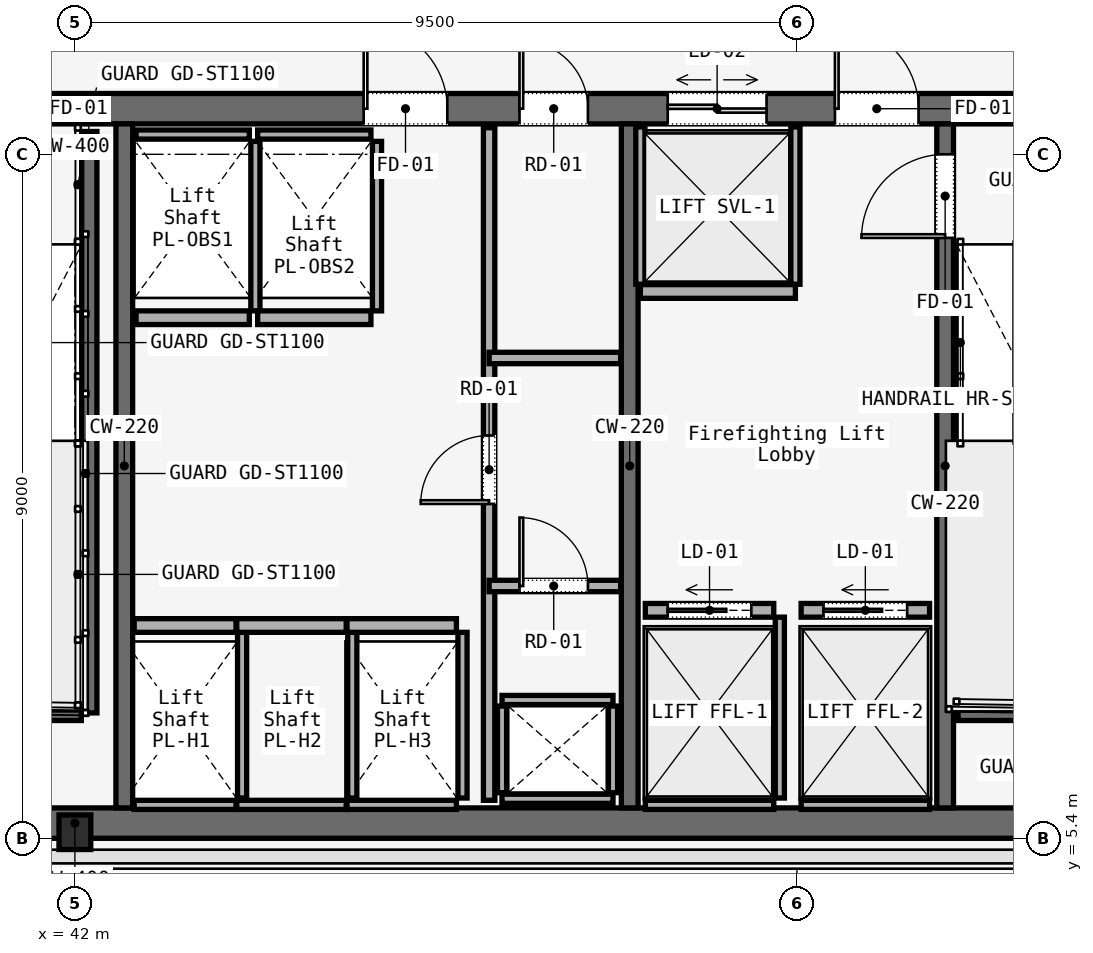
"""IFC4 building model, lengths in metres.
Left out: names, types, materials, properties, quantities, classifications, styles, units other than length and angle.
Written with IfcOpenShell. Run it as: python <this file> out.ifc"""

import sys

from ifc_helpers import new_model, si_unit, direction, frame, frame_2d, origin, origin_2d, place, context, subcontext, project, spatial, rectangle, i_section, extrude, element, fill, save


model = new_model("IFC4")
c1 = context("Model", 3, precision=1e-05, world=origin(), true_north=direction((0.0, 1.0)))
c2 = subcontext(c1, "Body", "Model", "MODEL_VIEW")
j1 = project(units=[si_unit("LENGTHUNIT", "METRE"), si_unit("PLANEANGLEUNIT", "RADIAN")], contexts=[c1])
p1 = place(None, origin())
s1 = spatial("IfcSite", under=j1, at=p1, CompositionType="ELEMENT")
p2 = place(p1, origin())
s2 = spatial("IfcBuilding", under=s1, at=p2, CompositionType="ELEMENT")
p3 = place(p2, frame((0.0, 0.0, 180.2)))
s3 = spatial("IfcBuildingStorey", under=s2, at=p3, CompositionType="ELEMENT", Elevation=180.2)
p4 = place(p3, frame((26.45, 15.0, 0.0), z_axis=(0.0, 0.0, 1.0), x_axis=(1.0, 0.0, 0.0)))
e1 = element("IfcWall", 1, at=p4, inside=s3, PredefinedType="SOLIDWALL", context=c2, shape_type="SweptSolid", body=[
    extrude(rectangle(XDim=31.1, YDim=0.4, at=frame_2d((15.55, 0.0))), origin(), (0.0, 0.0, 1.0), 3.58),
])
p5 = place(p4, frame((1.65, 0.0, 0.0)))
e2 = element("IfcOpeningElement", 2, at=p5, cuts=e1, PredefinedType="OPENING", context=c2, shape_type="SweptSolid", body=[
    extrude(rectangle(XDim=1.1, YDim=2.2, at=frame_2d((0.55, 1.1))), frame((0.0, 0.2, 0.0), z_axis=(0.0, -1.0, 0.0), x_axis=(1.0, 0.0, 0.0)), (0.0, 0.0, 1.0), 0.4),
])
p6 = place(p4, frame((13.65, 0.0, 0.0)))
e3 = element("IfcOpeningElement", 3, at=p6, cuts=e1, PredefinedType="OPENING", context=c2, shape_type="SweptSolid", body=[
    extrude(rectangle(XDim=1.1, YDim=2.2, at=frame_2d((0.55, 1.1))), frame((0.0, 0.2, 0.0), z_axis=(0.0, -1.0, 0.0), x_axis=(1.0, 0.0, 0.0)), (0.0, 0.0, 1.0), 0.4),
])
p7 = place(p4, frame((25.55, 0.0, 0.0)))
e4 = element("IfcOpeningElement", 4, at=p7, cuts=e1, PredefinedType="OPENING", context=c2, shape_type="SweptSolid", body=[
    extrude(rectangle(XDim=1.1, YDim=2.2, at=frame_2d((0.55, 1.1))), frame((0.0, 0.2, 0.0), z_axis=(0.0, -1.0, 0.0), x_axis=(1.0, 0.0, 0.0)), (0.0, 0.0, 1.0), 0.4),
])
p8 = place(p4, frame((10.7, 0.0, 0.0)))
e5 = element("IfcOpeningElement", 5, at=p8, cuts=e1, PredefinedType="OPENING", context=c2, shape_type="SweptSolid", body=[
    extrude(rectangle(XDim=1.4, YDim=2.2, at=frame_2d((0.7, 1.1))), frame((0.0, 0.2, 0.0), z_axis=(0.0, -1.0, 0.0), x_axis=(1.0, 0.0, 0.0)), (0.0, 0.0, 1.0), 0.4),
])
p9 = place(p4, frame((19.35, 0.0, 0.0)))
e6 = element("IfcOpeningElement", 6, at=p9, cuts=e1, PredefinedType="OPENING", context=c2, shape_type="SweptSolid", body=[
    extrude(rectangle(XDim=1.1, YDim=2.2, at=frame_2d((0.55, 1.1))), frame((0.0, 0.2, 0.0), z_axis=(0.0, -1.0, 0.0), x_axis=(1.0, 0.0, 0.0)), (0.0, 0.0, 1.0), 0.4),
])
p10 = place(p4, frame((21.4, 0.0, 0.0)))
e7 = element("IfcOpeningElement", 7, at=p10, cuts=e1, PredefinedType="OPENING", context=c2, shape_type="SweptSolid", body=[
    extrude(rectangle(XDim=0.9, YDim=2.1, at=frame_2d((0.45, 1.05))), frame((0.0, 0.2, 0.0), z_axis=(0.0, -1.0, 0.0), x_axis=(1.0, 0.0, 0.0)), (0.0, 0.0, 1.0), 0.4),
])
p11 = place(p4, frame((23.35, 0.0, 0.0)))
e8 = element("IfcOpeningElement", 8, at=p11, cuts=e1, PredefinedType="OPENING", context=c2, shape_type="SweptSolid", body=[
    extrude(rectangle(XDim=1.3, YDim=2.3, at=frame_2d((0.65, 1.15))), frame((0.0, 0.2, 0.0), z_axis=(0.0, -1.0, 0.0), x_axis=(1.0, 0.0, 0.0)), (0.0, 0.0, 1.0), 0.4),
])
p12 = place(p3, frame((26.45, 5.6, 0.0), z_axis=(0.0, 0.0, 1.0), x_axis=(1.0, 0.0, 0.0)))
e9 = element("IfcWall", 9, at=p12, inside=s3, PredefinedType="SOLIDWALL", context=c2, shape_type="SweptSolid", body=[
    extrude(rectangle(XDim=31.1, YDim=0.4, at=frame_2d((15.55, 0.0))), origin(), (0.0, 0.0, 1.0), 3.58),
])
for number, where, z_axis, x_axis in (
    (10, (42.65, 5.8, 0.0), (0.0, 0.0, 1.0), (0.0, 1.0, 0.0)),
    (11, (49.3, 5.8, 0.0), (0.0, 0.0, 1.0), (0.0, 1.0, 0.0)),
):
    element("IfcWall", number, at=place(p3, frame(where, z_axis=z_axis, x_axis=x_axis)), inside=s3, PredefinedType="SOLIDWALL", context=c2, shape_type="SweptSolid", body=[
        extrude(rectangle(XDim=9.0, YDim=0.22, at=frame_2d((4.5, 0.0))), origin(), (0.0, 0.0, 1.0), 3.58),
    ])
p13 = place(p3, frame((53.45, 5.8, 0.0), z_axis=(0.0, 0.0, 1.0), x_axis=(0.0, 1.0, 0.0)))
e12 = element("IfcWall", 12, at=p13, inside=s3, PredefinedType="SOLIDWALL", context=c2, shape_type="SweptSolid", body=[
    extrude(rectangle(XDim=9.0, YDim=0.22, at=frame_2d((4.5, 0.0))), origin(), (0.0, 0.0, 1.0), 3.58),
])
p14 = place(p13, frame((7.5, 0.0, 0.0)))
e13 = element("IfcOpeningElement", 13, at=p14, cuts=e12, PredefinedType="OPENING", context=c2, shape_type="SweptSolid", body=[
    extrude(rectangle(XDim=1.1, YDim=2.2, at=frame_2d((0.55, 1.1))), frame((0.0, 0.11, 0.0), z_axis=(0.0, -1.0, 0.0), x_axis=(1.0, 0.0, 0.0)), (0.0, 0.0, 1.0), 0.22),
])
p15 = place(p3, frame((42.0, 5.48, 0.0), z_axis=(0.0, 0.0, 1.0), x_axis=(1.0, 0.0, 0.0)))
e14 = element("IfcColumn", 14, at=p15, inside=s3, PredefinedType="COLUMN", context=c2, shape_type="SweptSolid", body=[
    extrude(i_section(OverallWidth=0.418, OverallDepth=0.455, WebThickness=0.042, FlangeThickness=0.052, FilletRadius=0.015, at=origin_2d()), origin(), (0.0, 0.0, 1.0), 3.58),
])
p16 = place(p3, frame((42.19, 14.7, 0.0), z_axis=(0.0, 0.0, 1.0), x_axis=(0.0, -1.0, 0.0)))
e15 = element("IfcWall", 15, at=p16, inside=s3, PredefinedType="SOLIDWALL", context=c2, shape_type="SweptSolid", body=[
    extrude(rectangle(XDim=7.65, YDim=0.2, at=frame_2d((3.825, 0.0))), origin(), (0.0, 0.0, 1.0), 3.8),
])
for number, where, z_axis, x_axis in (
    (16, (38.97, 7.05, 0.0), (0.0, 0.0, 1.0), (1.0, 0.0, 0.0)),
    (17, (53.62, 7.05, 0.0), (0.0, 0.0, 1.0), (1.0, 0.0, 0.0)),
):
    element("IfcWall", number, at=place(p3, frame(where, z_axis=z_axis, x_axis=x_axis)), inside=s3, PredefinedType="SOLIDWALL", context=c2, shape_type="SweptSolid", body=[
        extrude(rectangle(XDim=3.115, YDim=0.2, at=frame_2d((1.558, 0.0))), origin(), (0.0, 0.0, 1.0), 3.8),
    ])
for number, where, z_axis, x_axis in (
    (18, (47.62, 5.92, 0.0), (0.0, 0.0, 1.0), (1.0, 0.0, 0.0)),
    (19, (47.62, 7.22, 0.0), (0.0, 0.0, 1.0), (1.0, 0.0, 0.0)),
):
    element("IfcWall", number, at=place(p3, frame(where, z_axis=z_axis, x_axis=x_axis)), inside=s3, PredefinedType="SOLIDWALL", context=c2, shape_type="SweptSolid", body=[
        extrude(rectangle(XDim=1.46, YDim=0.12, at=frame_2d((0.73, 0.0))), origin(), (0.0, 0.0, 1.0), 3.01),
    ])
for number, where, z_axis, x_axis in (
    (20, (47.62, 6.0, 0.0), (0.0, 0.0, 1.0), (0.0, 1.0, 0.0)),
    (21, (49.08, 6.0, 0.0), (0.0, 0.0, 1.0), (0.0, 1.0, 0.0)),
):
    element("IfcWall", number, at=place(p3, frame(where, z_axis=z_axis, x_axis=x_axis)), inside=s3, PredefinedType="SOLIDWALL", context=c2, shape_type="SweptSolid", body=[
        extrude(rectangle(XDim=1.14, YDim=0.12, at=frame_2d((0.57, 0.0))), origin(), (0.0, 0.0, 1.0), 3.01),
    ])
p17 = place(p3, frame((47.45, 5.9, 0.0), z_axis=(0.0, 0.0, 1.0), x_axis=(0.0, 1.0, 0.0)))
e22 = element("IfcWall", 22, at=p17, inside=s3, PredefinedType="PARTITIONING", context=c2, shape_type="SweptSolid", body=[
    extrude(rectangle(XDim=8.85, YDim=0.15, at=frame_2d((4.425, 0.0))), origin(), (0.0, 0.0, 1.0), 3.01),
])
p18 = place(p17, frame((3.9, 0.0, 0.0)))
e23 = element("IfcOpeningElement", 23, at=p18, cuts=e22, PredefinedType="OPENING", context=c2, shape_type="SweptSolid", body=[
    extrude(rectangle(XDim=0.9, YDim=2.1, at=frame_2d((0.45, 1.05))), frame((0.0, 0.075, 0.0), z_axis=(0.0, -1.0, 0.0), x_axis=(1.0, 0.0, 0.0)), (0.0, 0.0, 1.0), 0.15),
])
p19 = place(p3, frame((47.45, 8.72, 0.0), z_axis=(0.0, 0.0, 1.0), x_axis=(1.0, 0.0, 0.0)))
e24 = element("IfcWall", 24, at=p19, inside=s3, PredefinedType="PARTITIONING", context=c2, shape_type="SweptSolid", body=[
    extrude(rectangle(XDim=1.73, YDim=0.15, at=frame_2d((0.865, 0.0))), origin(), (0.0, 0.0, 1.0), 3.01),
])
p20 = place(p19, frame((0.4, 0.0, 0.0)))
e25 = element("IfcOpeningElement", 25, at=p20, cuts=e24, PredefinedType="OPENING", context=c2, shape_type="SweptSolid", body=[
    extrude(rectangle(XDim=0.9, YDim=2.1, at=frame_2d((0.45, 1.05))), frame((0.0, 0.075, 0.0), z_axis=(0.0, -1.0, 0.0), x_axis=(1.0, 0.0, 0.0)), (0.0, 0.0, 1.0), 0.15),
])
p21 = place(p3, frame((47.45, 11.72, 0.0), z_axis=(0.0, 0.0, 1.0), x_axis=(1.0, 0.0, 0.0)))
e26 = element("IfcWall", 26, at=p21, inside=s3, PredefinedType="PARTITIONING", context=c2, shape_type="SweptSolid", body=[
    extrude(rectangle(XDim=1.73, YDim=0.15, at=frame_2d((0.865, 0.0))), origin(), (0.0, 0.0, 1.0), 3.01),
])
p22 = place(p3, frame((42.78, 8.2, 0.0), z_axis=(0.0, 0.0, 1.0), x_axis=(1.0, 0.0, 0.0)))
e27 = element("IfcWall", 27, at=p22, inside=s3, PredefinedType="SOLIDWALL", context=c2, shape_type="SweptSolid", body=[
    extrude(rectangle(XDim=1.34, YDim=0.18, at=frame_2d((0.67, 0.0))), origin(), (0.0, 0.0, 1.0), 3.01),
])
p23 = place(p3, frame((42.78, 5.84, 0.0), z_axis=(0.0, 0.0, 1.0), x_axis=(1.0, 0.0, 0.0)))
e28 = element("IfcWall", 28, at=p23, inside=s3, PredefinedType="SOLIDWALL", context=c2, shape_type="SweptSolid", body=[
    extrude(rectangle(XDim=1.34, YDim=0.12, at=frame_2d((0.67, 0.0))), origin(), (0.0, 0.0, 1.0), 3.01),
])
p24 = place(p3, frame((44.2, 5.93, 0.0), z_axis=(0.0, 0.0, 1.0), x_axis=(0.0, 1.0, 0.0)))
e29 = element("IfcWall", 29, at=p24, inside=s3, PredefinedType="SOLIDWALL", context=c2, shape_type="SweptSolid", body=[
    extrude(rectangle(XDim=2.18, YDim=0.12, at=frame_2d((1.09, 0.0))), origin(), (0.0, 0.0, 1.0), 3.01),
])
p25 = place(p3, frame((44.13, 8.2, 0.0), z_axis=(0.0, 0.0, 1.0), x_axis=(1.0, 0.0, 0.0)))
e30 = element("IfcWall", 30, at=p25, inside=s3, PredefinedType="SOLIDWALL", context=c2, shape_type="SweptSolid", body=[
    extrude(rectangle(XDim=1.44, YDim=0.18, at=frame_2d((0.72, 0.0))), origin(), (0.0, 0.0, 1.0), 3.01),
])
p26 = place(p3, frame((44.13, 5.84, 0.0), z_axis=(0.0, 0.0, 1.0), x_axis=(1.0, 0.0, 0.0)))
e31 = element("IfcWall", 31, at=p26, inside=s3, PredefinedType="SOLIDWALL", context=c2, shape_type="SweptSolid", body=[
    extrude(rectangle(XDim=1.44, YDim=0.12, at=frame_2d((0.72, 0.0))), origin(), (0.0, 0.0, 1.0), 3.01),
])
p27 = place(p3, frame((45.65, 5.93, 0.0), z_axis=(0.0, 0.0, 1.0), x_axis=(0.0, 1.0, 0.0)))
e32 = element("IfcWall", 32, at=p27, inside=s3, PredefinedType="SOLIDWALL", context=c2, shape_type="SweptSolid", body=[
    extrude(rectangle(XDim=2.18, YDim=0.12, at=frame_2d((1.09, 0.0))), origin(), (0.0, 0.0, 1.0), 3.01),
])
p28 = place(p3, frame((45.58, 8.2, 0.0), z_axis=(0.0, 0.0, 1.0), x_axis=(1.0, 0.0, 0.0)))
e33 = element("IfcWall", 33, at=p28, inside=s3, PredefinedType="SOLIDWALL", context=c2, shape_type="SweptSolid", body=[
    extrude(rectangle(XDim=1.44, YDim=0.18, at=frame_2d((0.72, 0.0))), origin(), (0.0, 0.0, 1.0), 3.01),
])
p29 = place(p3, frame((45.58, 5.84, 0.0), z_axis=(0.0, 0.0, 1.0), x_axis=(1.0, 0.0, 0.0)))
e34 = element("IfcWall", 34, at=p29, inside=s3, PredefinedType="SOLIDWALL", context=c2, shape_type="SweptSolid", body=[
    extrude(rectangle(XDim=1.44, YDim=0.12, at=frame_2d((0.72, 0.0))), origin(), (0.0, 0.0, 1.0), 3.01),
])
p30 = place(p3, frame((47.1, 5.93, 0.0), z_axis=(0.0, 0.0, 1.0), x_axis=(0.0, 1.0, 0.0)))
e35 = element("IfcWall", 35, at=p30, inside=s3, PredefinedType="SOLIDWALL", context=c2, shape_type="SweptSolid", body=[
    extrude(rectangle(XDim=2.18, YDim=0.12, at=frame_2d((1.09, 0.0))), origin(), (0.0, 0.0, 1.0), 3.01),
])
p31 = place(p3, frame((42.805, 12.25, 0.0), z_axis=(0.0, 0.0, 1.0), x_axis=(1.0, 0.0, 0.0)))
e36 = element("IfcWall", 36, at=p31, inside=s3, PredefinedType="SOLIDWALL", context=c2, shape_type="SweptSolid", body=[
    extrude(rectangle(XDim=1.49, YDim=0.18, at=frame_2d((0.745, 0.0))), origin(), (0.0, 0.0, 1.0), 3.01),
])
p32 = place(p3, frame((42.805, 14.66, 0.0), z_axis=(0.0, 0.0, 1.0), x_axis=(1.0, 0.0, 0.0)))
e37 = element("IfcWall", 37, at=p32, inside=s3, PredefinedType="SOLIDWALL", context=c2, shape_type="SweptSolid", body=[
    extrude(rectangle(XDim=1.49, YDim=0.12, at=frame_2d((0.745, 0.0))), origin(), (0.0, 0.0, 1.0), 3.01),
])
p33 = place(p3, frame((44.375, 12.34, 0.0), z_axis=(0.0, 0.0, 1.0), x_axis=(0.0, 1.0, 0.0)))
e38 = element("IfcWall", 38, at=p33, inside=s3, PredefinedType="SOLIDWALL", context=c2, shape_type="SweptSolid", body=[
    extrude(rectangle(XDim=2.23, YDim=0.12, at=frame_2d((1.115, 0.0))), origin(), (0.0, 0.0, 1.0), 3.01),
])
p34 = place(p3, frame((44.405, 12.25, 0.0), z_axis=(0.0, 0.0, 1.0), x_axis=(1.0, 0.0, 0.0)))
e39 = element("IfcWall", 39, at=p34, inside=s3, PredefinedType="SOLIDWALL", context=c2, shape_type="SweptSolid", body=[
    extrude(rectangle(XDim=1.49, YDim=0.18, at=frame_2d((0.745, 0.0))), origin(), (0.0, 0.0, 1.0), 3.01),
])
p35 = place(p3, frame((44.405, 14.66, 0.0), z_axis=(0.0, 0.0, 1.0), x_axis=(1.0, 0.0, 0.0)))
e40 = element("IfcWall", 40, at=p35, inside=s3, PredefinedType="SOLIDWALL", context=c2, shape_type="SweptSolid", body=[
    extrude(rectangle(XDim=1.49, YDim=0.12, at=frame_2d((0.745, 0.0))), origin(), (0.0, 0.0, 1.0), 3.01),
])
p36 = place(p3, frame((45.975, 12.34, 0.0), z_axis=(0.0, 0.0, 1.0), x_axis=(0.0, 1.0, 0.0)))
e41 = element("IfcWall", 41, at=p36, inside=s3, PredefinedType="SOLIDWALL", context=c2, shape_type="SweptSolid", body=[
    extrude(rectangle(XDim=2.23, YDim=0.12, at=frame_2d((1.115, 0.0))), origin(), (0.0, 0.0, 1.0), 3.01),
])
p37 = place(p3, frame((49.505, 8.4, 0.0), z_axis=(0.0, 0.0, 1.0), x_axis=(1.0, 0.0, 0.0)))
e42 = element("IfcWall", 42, at=p37, inside=s3, PredefinedType="SOLIDWALL", context=c2, shape_type="SweptSolid", body=[
    extrude(rectangle(XDim=1.69, YDim=0.18, at=frame_2d((0.845, 0.0))), origin(), (0.0, 0.0, 1.0), 3.01),
])
p38 = place(p37, frame((0.295, 0.0, 0.0)))
e43 = element("IfcOpeningElement", 43, at=p38, cuts=e42, PredefinedType="OPENING", context=c2, shape_type="SweptSolid", body=[
    extrude(rectangle(XDim=1.1, YDim=2.2, at=frame_2d((0.55, 1.1))), frame((0.0, 0.09, 0.0), z_axis=(0.0, -1.0, 0.0), x_axis=(1.0, 0.0, 0.0)), (0.0, 0.0, 1.0), 0.18),
])
p39 = place(p3, frame((49.505, 5.84, 0.0), z_axis=(0.0, 0.0, 1.0), x_axis=(1.0, 0.0, 0.0)))
e44 = element("IfcWall", 44, at=p39, inside=s3, PredefinedType="SOLIDWALL", context=c2, shape_type="SweptSolid", body=[
    extrude(rectangle(XDim=1.69, YDim=0.12, at=frame_2d((0.845, 0.0))), origin(), (0.0, 0.0, 1.0), 3.01),
])
p40 = place(p3, frame((51.275, 5.93, 0.0), z_axis=(0.0, 0.0, 1.0), x_axis=(0.0, 1.0, 0.0)))
e45 = element("IfcWall", 45, at=p40, inside=s3, PredefinedType="SOLIDWALL", context=c2, shape_type="SweptSolid", body=[
    extrude(rectangle(XDim=2.38, YDim=0.12, at=frame_2d((1.19, 0.0))), origin(), (0.0, 0.0, 1.0), 3.01),
])
p41 = place(p3, frame((51.555, 8.4, 0.0), z_axis=(0.0, 0.0, 1.0), x_axis=(1.0, 0.0, 0.0)))
e46 = element("IfcWall", 46, at=p41, inside=s3, PredefinedType="SOLIDWALL", context=c2, shape_type="SweptSolid", body=[
    extrude(rectangle(XDim=1.69, YDim=0.18, at=frame_2d((0.845, 0.0))), origin(), (0.0, 0.0, 1.0), 3.01),
])
p42 = place(p41, frame((0.295, 0.0, 0.0)))
e47 = element("IfcOpeningElement", 47, at=p42, cuts=e46, PredefinedType="OPENING", context=c2, shape_type="SweptSolid", body=[
    extrude(rectangle(XDim=1.1, YDim=2.2, at=frame_2d((0.55, 1.1))), frame((0.0, 0.09, 0.0), z_axis=(0.0, -1.0, 0.0), x_axis=(1.0, 0.0, 0.0)), (0.0, 0.0, 1.0), 0.18),
])
p43 = place(p3, frame((51.555, 5.84, 0.0), z_axis=(0.0, 0.0, 1.0), x_axis=(1.0, 0.0, 0.0)))
e48 = element("IfcWall", 48, at=p43, inside=s3, PredefinedType="SOLIDWALL", context=c2, shape_type="SweptSolid", body=[
    extrude(rectangle(XDim=1.69, YDim=0.12, at=frame_2d((0.845, 0.0))), origin(), (0.0, 0.0, 1.0), 3.01),
])
p44 = place(p3, frame((49.44, 12.595, 0.0), z_axis=(0.0, 0.0, 1.0), x_axis=(1.0, 0.0, 0.0)))
e49 = element("IfcWall", 49, at=p44, inside=s3, PredefinedType="SOLIDWALL", context=c2, shape_type="SweptSolid", body=[
    extrude(rectangle(XDim=2.04, YDim=0.18, at=frame_2d((1.02, 0.0))), origin(), (0.0, 0.0, 1.0), 3.01),
])
for number, where, z_axis, x_axis in (
    (50, (49.44, 12.69, 0.0), (0.0, 0.0, 1.0), (0.0, 1.0, 0.0)),
    (51, (51.48, 12.69, 0.0), (0.0, 0.0, 1.0), (0.0, 1.0, 0.0)),
):
    element("IfcWall", number, at=place(p3, frame(where, z_axis=z_axis, x_axis=x_axis)), inside=s3, PredefinedType="SOLIDWALL", context=c2, shape_type="SweptSolid", body=[
        extrude(rectangle(XDim=2.07, YDim=0.12, at=frame_2d((1.035, 0.0))), origin(), (0.0, 0.0, 1.0), 3.01),
    ])
p45 = place(p7, origin())
e52 = element("IfcDoor", 52, at=p45, inside=s3, OperationType="SINGLE_SWING_RIGHT", PredefinedType="DOOR", context=c2, shape_type="SweptSolid", body=[
    extrude(rectangle(XDim=1.1, YDim=2.2, at=frame_2d((0.55, 1.1))), frame((0.0, 0.025, 0.0), z_axis=(0.0, -1.0, 0.0), x_axis=(1.0, 0.0, 0.0)), (0.0, 0.0, 1.0), 0.05),
])
fill(e4, e52)
p46 = place(p9, origin())
e53 = element("IfcDoor", 53, at=p46, inside=s3, OperationType="SINGLE_SWING_LEFT", PredefinedType="DOOR", context=c2, shape_type="SweptSolid", body=[
    extrude(rectangle(XDim=1.1, YDim=2.2, at=frame_2d((0.55, 1.1))), frame((0.0, 0.025, 0.0), z_axis=(0.0, -1.0, 0.0), x_axis=(1.0, 0.0, 0.0)), (0.0, 0.0, 1.0), 0.05),
])
fill(e6, e53)
p47 = place(p10, origin())
e54 = element("IfcDoor", 54, at=p47, inside=s3, OperationType="SINGLE_SWING_LEFT", PredefinedType="DOOR", context=c2, shape_type="SweptSolid", body=[
    extrude(rectangle(XDim=0.9, YDim=2.1, at=frame_2d((0.45, 1.05))), frame((0.0, 0.025, 0.0), z_axis=(0.0, -1.0, 0.0), x_axis=(1.0, 0.0, 0.0)), (0.0, 0.0, 1.0), 0.05),
])
fill(e7, e54)
p48 = place(p14, origin())
e55 = element("IfcDoor", 55, at=p48, inside=s3, OperationType="SINGLE_SWING_LEFT", PredefinedType="DOOR", context=c2, shape_type="SweptSolid", body=[
    extrude(rectangle(XDim=1.1, YDim=2.2, at=frame_2d((0.55, 1.1))), frame((0.0, 0.025, 0.0), z_axis=(0.0, -1.0, 0.0), x_axis=(1.0, 0.0, 0.0)), (0.0, 0.0, 1.0), 0.05),
])
fill(e13, e55)
p49 = place(p18, origin())
e56 = element("IfcDoor", 56, at=p49, inside=s3, OperationType="SINGLE_SWING_LEFT", PredefinedType="DOOR", context=c2, shape_type="SweptSolid", body=[
    extrude(rectangle(XDim=0.9, YDim=2.1, at=frame_2d((0.45, 1.05))), frame((0.0, 0.025, 0.0), z_axis=(0.0, -1.0, 0.0), x_axis=(1.0, 0.0, 0.0)), (0.0, 0.0, 1.0), 0.05),
])
fill(e23, e56)
p50 = place(p20, origin())
e57 = element("IfcDoor", 57, at=p50, inside=s3, OperationType="SINGLE_SWING_RIGHT", PredefinedType="DOOR", context=c2, shape_type="SweptSolid", body=[
    extrude(rectangle(XDim=0.9, YDim=2.1, at=frame_2d((0.45, 1.05))), frame((0.0, 0.025, 0.0), z_axis=(0.0, -1.0, 0.0), x_axis=(1.0, 0.0, 0.0)), (0.0, 0.0, 1.0), 0.05),
])
fill(e25, e57)
p51 = place(p38, origin())
e58 = element("IfcDoor", 58, at=p51, inside=s3, OperationType="SLIDING_TO_LEFT", PredefinedType="DOOR", context=c2, shape_type="SweptSolid", body=[
    extrude(rectangle(XDim=1.1, YDim=2.2, at=frame_2d((0.55, 1.1))), frame((0.0, 0.025, 0.0), z_axis=(0.0, -1.0, 0.0), x_axis=(1.0, 0.0, 0.0)), (0.0, 0.0, 1.0), 0.05),
])
fill(e43, e58)
p52 = place(p42, origin())
e59 = element("IfcDoor", 59, at=p52, inside=s3, OperationType="SLIDING_TO_LEFT", PredefinedType="DOOR", context=c2, shape_type="SweptSolid", body=[
    extrude(rectangle(XDim=1.1, YDim=2.2, at=frame_2d((0.55, 1.1))), frame((0.0, 0.025, 0.0), z_axis=(0.0, -1.0, 0.0), x_axis=(1.0, 0.0, 0.0)), (0.0, 0.0, 1.0), 0.05),
])
fill(e47, e59)
p53 = place(p11, origin())
e60 = element("IfcDoor", 60, at=p53, inside=s3, OperationType="DOUBLE_DOOR_SLIDING", PredefinedType="DOOR", context=c2, shape_type="SweptSolid", body=[
    extrude(rectangle(XDim=1.3, YDim=2.3, at=frame_2d((0.65, 1.15))), frame((0.0, 0.025, 0.0), z_axis=(0.0, -1.0, 0.0), x_axis=(1.0, 0.0, 0.0)), (0.0, 0.0, 1.0), 0.05),
])
fill(e8, e60)
save(model, sys.argv[1])
